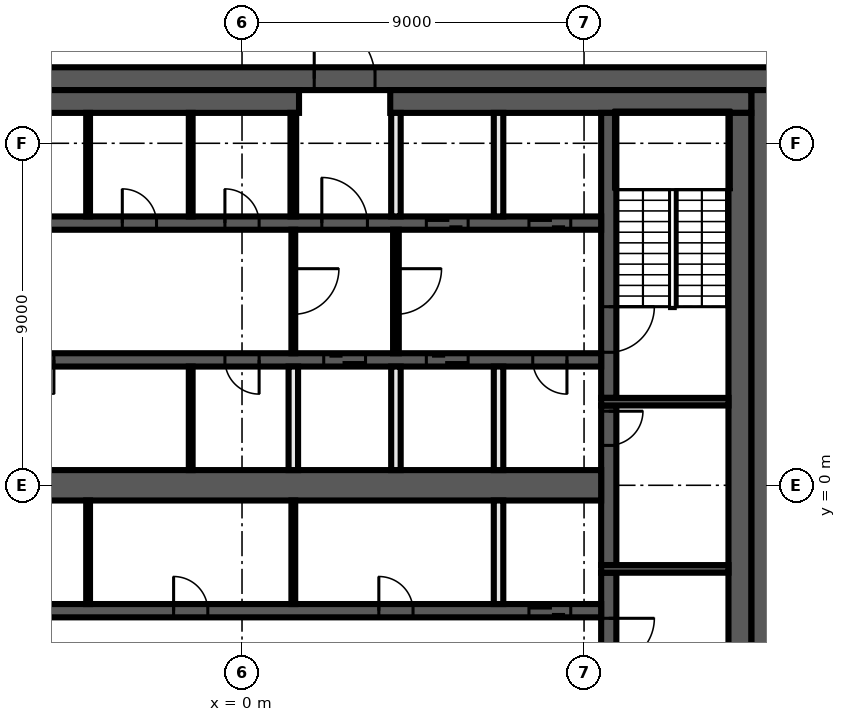
"""IFC4 building model, lengths in metres.
Left out: names, types, materials, properties, quantities, classifications, styles, units other than length and angle.
Written with IfcOpenShell. Run it as: python <this file> out.ifc"""

import sys

from ifc_helpers import new_model, si_unit, direction, frame, frame_2d, origin, place, context, subcontext, project, spatial, rectangle, extrude, element, fill, save


model = new_model("IFC4")
c1 = context("Model", 3, precision=1e-05, world=origin(), true_north=direction((0.0, 1.0)))
c2 = subcontext(c1, "Body", "Model", "MODEL_VIEW")
j1 = project(units=[si_unit("LENGTHUNIT", "METRE"), si_unit("PLANEANGLEUNIT", "RADIAN")], contexts=[c1])
p1 = place(None, origin())
s1 = spatial("IfcSite", under=j1, at=p1, CompositionType="ELEMENT")
p2 = place(p1, origin())
s2 = spatial("IfcBuilding", under=s1, at=p2, CompositionType="ELEMENT")
p3 = place(p2, frame((0.0, 0.0, 319.4)))
s3 = spatial("IfcBuildingStorey", under=s2, at=p3, CompositionType="ELEMENT", Elevation=319.4)
p4 = place(p3, frame((-14.0, 10.7, 0.0), z_axis=(0.0, 0.0, 1.0), x_axis=(1.0, 0.0, 0.0)))
e1 = element("IfcWall", 1, at=p4, inside=s3, PredefinedType="SHEAR", context=c2, shape_type="SweptSolid", body=[
    extrude(rectangle(XDim=28.0, YDim=0.6, at=frame_2d((14.0, 0.0))), origin(), (0.0, 0.0, 1.0), 3.82),
])
p5 = place(p4, frame((15.9, 0.0, 0.0)))
e2 = element("IfcOpeningElement", 2, at=p5, cuts=e1, PredefinedType="OPENING", context=c2, shape_type="SweptSolid", body=[
    extrude(rectangle(XDim=1.6, YDim=2.1, at=frame_2d((0.8, 1.05))), frame((0.0, 0.31, 0.0), z_axis=(0.0, -1.0, 0.0), x_axis=(1.0, 0.0, 0.0)), (0.0, 0.0, 1.0), 0.62),
])
p6 = place(p3, frame((13.7, 10.4, 0.0), z_axis=(0.0, 0.0, 1.0), x_axis=(0.0, -1.0, 0.0)))
e3 = element("IfcWall", 3, at=p6, inside=s3, PredefinedType="SHEAR", context=c2, shape_type="SweptSolid", body=[
    extrude(rectangle(XDim=20.8, YDim=0.6, at=frame_2d((10.4, 0.0))), origin(), (0.0, 0.0, 1.0), 3.82),
])
p7 = place(p3, frame((-13.4, 10.1, 0.0), z_axis=(0.0, 0.0, 1.0), x_axis=(1.0, 0.0, 0.0)))
e4 = element("IfcWall", 4, at=p7, inside=s3, PredefinedType="SHEAR", context=c2, shape_type="SweptSolid", body=[
    extrude(rectangle(XDim=14.9, YDim=0.6, at=frame_2d((7.45, 0.0))), origin(), (0.0, 0.0, 1.0), 3.82),
])
p8 = place(p3, frame((3.9, 10.1, 0.0), z_axis=(0.0, 0.0, 1.0), x_axis=(1.0, 0.0, 0.0)))
e5 = element("IfcWall", 5, at=p8, inside=s3, PredefinedType="SHEAR", context=c2, shape_type="SweptSolid", body=[
    extrude(rectangle(XDim=9.5, YDim=0.6, at=frame_2d((4.75, 0.0))), origin(), (0.0, 0.0, 1.0), 3.82),
])
p9 = place(p3, frame((13.1, 9.8, 0.0), z_axis=(0.0, 0.0, 1.0), x_axis=(0.0, -1.0, 0.0)))
e6 = element("IfcWall", 6, at=p9, inside=s3, PredefinedType="SHEAR", context=c2, shape_type="SweptSolid", body=[
    extrude(rectangle(XDim=19.6, YDim=0.6, at=frame_2d((9.8, 0.0))), origin(), (0.0, 0.0, 1.0), 3.82),
])
p10 = place(p3, frame((9.65, -2.3, 0.0), z_axis=(0.0, 0.0, 1.0), x_axis=(0.0, -1.0, 0.0)))
e7 = element("IfcWall", 7, at=p10, inside=s3, PredefinedType="SHEAR", context=c2, shape_type="SweptSolid", body=[
    extrude(rectangle(XDim=7.5, YDim=0.4, at=frame_2d((3.75, 0.0))), origin(), (0.0, 0.0, 1.0), 3.82),
])
p11 = place(p10, frame((1.2, 0.0, 0.0)))
e8 = element("IfcOpeningElement", 8, at=p11, cuts=e7, PredefinedType="OPENING", context=c2, shape_type="SweptSolid", body=[
    extrude(rectangle(XDim=1.2, YDim=2.1, at=frame_2d((0.6, 1.05))), frame((0.0, 0.21, 0.0), z_axis=(0.0, -1.0, 0.0), x_axis=(1.0, 0.0, 0.0)), (0.0, 0.0, 1.0), 0.42),
])
p12 = place(p3, frame((9.65, 2.1, 0.0), z_axis=(0.0, 0.0, 1.0), x_axis=(0.0, -1.0, 0.0)))
e9 = element("IfcWall", 9, at=p12, inside=s3, PredefinedType="SHEAR", context=c2, shape_type="SweptSolid", body=[
    extrude(rectangle(XDim=4.2, YDim=0.4, at=frame_2d((2.1, 0.0))), origin(), (0.0, 0.0, 1.0), 3.82),
])
p13 = place(p12, frame((0.15, 0.0, 0.0)))
e10 = element("IfcOpeningElement", 10, at=p13, cuts=e9, PredefinedType="OPENING", context=c2, shape_type="SweptSolid", body=[
    extrude(rectangle(XDim=0.9, YDim=2.1, at=frame_2d((0.45, 1.05))), frame((0.0, 0.21, 0.0), z_axis=(0.0, -1.0, 0.0), x_axis=(1.0, 0.0, 0.0)), (0.0, 0.0, 1.0), 0.42),
])
p14 = place(p3, frame((9.65, 9.8, 0.0), z_axis=(0.0, 0.0, 1.0), x_axis=(0.0, -1.0, 0.0)))
e11 = element("IfcWall", 11, at=p14, inside=s3, PredefinedType="SHEAR", context=c2, shape_type="SweptSolid", body=[
    extrude(rectangle(XDim=7.5, YDim=0.4, at=frame_2d((3.75, 0.0))), origin(), (0.0, 0.0, 1.0), 3.82),
])
p15 = place(p14, frame((5.1, 0.0, 0.0)))
e12 = element("IfcOpeningElement", 12, at=p15, cuts=e11, PredefinedType="OPENING", context=c2, shape_type="SweptSolid", body=[
    extrude(rectangle(XDim=1.2, YDim=2.1, at=frame_2d((0.6, 1.05))), frame((0.0, 0.21, 0.0), z_axis=(0.0, -1.0, 0.0), x_axis=(1.0, 0.0, 0.0)), (0.0, 0.0, 1.0), 0.42),
])
for number, where, z_axis, x_axis in (
    (13, (9.45, 2.2, 0.0), (0.0, 0.0, 1.0), (1.0, 0.0, 0.0)),
    (14, (9.45, -2.2, 0.0), (0.0, 0.0, 1.0), (1.0, 0.0, 0.0)),
):
    element("IfcWall", number, at=place(p3, frame(where, z_axis=z_axis, x_axis=x_axis)), inside=s3, PredefinedType="SHEAR", context=c2, shape_type="SweptSolid", body=[
        extrude(rectangle(XDim=3.35, YDim=0.2, at=frame_2d((1.675, 0.0))), origin(), (0.0, 0.0, 1.0), 3.82),
    ])
p16 = place(p3, frame((-9.45, 6.9, 0.0), z_axis=(0.0, 0.0, 1.0), x_axis=(1.0, 0.0, 0.0)))
e15 = element("IfcWall", 15, at=p16, inside=s3, PredefinedType="SHEAR", context=c2, shape_type="SweptSolid", body=[
    extrude(rectangle(XDim=18.9, YDim=0.35, at=frame_2d((9.45, 0.0))), origin(), (0.0, 0.0, 1.0), 3.82),
])
p17 = place(p16, frame((11.55, 0.0, 0.0)))
e16 = element("IfcOpeningElement", 16, at=p17, cuts=e15, PredefinedType="OPENING", context=c2, shape_type="SweptSolid", body=[
    extrude(rectangle(XDim=1.2, YDim=2.1, at=frame_2d((0.6, 1.05))), frame((0.0, 0.185, 0.0), z_axis=(0.0, -1.0, 0.0), x_axis=(1.0, 0.0, 0.0)), (0.0, 0.0, 1.0), 0.37),
])
p18 = place(p16, frame((14.3, 0.0, 0.0)))
e17 = element("IfcOpeningElement", 17, at=p18, cuts=e15, PredefinedType="OPENING", context=c2, shape_type="SweptSolid", body=[
    extrude(rectangle(XDim=1.1, YDim=2.1, at=frame_2d((0.55, 1.05))), frame((0.0, 0.185, 0.0), z_axis=(0.0, -1.0, 0.0), x_axis=(1.0, 0.0, 0.0)), (0.0, 0.0, 1.0), 0.37),
])
p19 = place(p16, frame((17.0, 0.0, 0.0)))
e18 = element("IfcOpeningElement", 18, at=p19, cuts=e15, PredefinedType="OPENING", context=c2, shape_type="SweptSolid", body=[
    extrude(rectangle(XDim=1.1, YDim=2.1, at=frame_2d((0.55, 1.05))), frame((0.0, 0.185, 0.0), z_axis=(0.0, -1.0, 0.0), x_axis=(1.0, 0.0, 0.0)), (0.0, 0.0, 1.0), 0.37),
])
p20 = place(p16, frame((2.25, 0.0, 0.0)))
e19 = element("IfcOpeningElement", 19, at=p20, cuts=e15, PredefinedType="OPENING", context=c2, shape_type="SweptSolid", body=[
    extrude(rectangle(XDim=0.9, YDim=2.1, at=frame_2d((0.45, 1.05))), frame((0.0, 0.185, 0.0), z_axis=(0.0, -1.0, 0.0), x_axis=(1.0, 0.0, 0.0)), (0.0, 0.0, 1.0), 0.37),
])
p21 = place(p16, frame((6.3, 0.0, 0.0)))
e20 = element("IfcOpeningElement", 20, at=p21, cuts=e15, PredefinedType="OPENING", context=c2, shape_type="SweptSolid", body=[
    extrude(rectangle(XDim=0.9, YDim=2.1, at=frame_2d((0.45, 1.05))), frame((0.0, 0.185, 0.0), z_axis=(0.0, -1.0, 0.0), x_axis=(1.0, 0.0, 0.0)), (0.0, 0.0, 1.0), 0.37),
])
p22 = place(p16, frame((9.0, 0.0, 0.0)))
e21 = element("IfcOpeningElement", 21, at=p22, cuts=e15, PredefinedType="OPENING", context=c2, shape_type="SweptSolid", body=[
    extrude(rectangle(XDim=0.9, YDim=2.1, at=frame_2d((0.45, 1.05))), frame((0.0, 0.185, 0.0), z_axis=(0.0, -1.0, 0.0), x_axis=(1.0, 0.0, 0.0)), (0.0, 0.0, 1.0), 0.37),
])
p23 = place(p3, frame((9.45, 3.3, 0.0), z_axis=(0.0, 0.0, 1.0), x_axis=(-1.0, 0.0, 0.0)))
e22 = element("IfcWall", 22, at=p23, inside=s3, PredefinedType="SHEAR", context=c2, shape_type="SweptSolid", body=[
    extrude(rectangle(XDim=18.9, YDim=0.35, at=frame_2d((9.45, 0.0))), origin(), (0.0, 0.0, 1.0), 3.82),
])
p24 = place(p23, frame((6.2, 0.0, 0.0)))
e23 = element("IfcOpeningElement", 23, at=p24, cuts=e22, PredefinedType="OPENING", context=c2, shape_type="SweptSolid", body=[
    extrude(rectangle(XDim=1.1, YDim=2.1, at=frame_2d((0.55, 1.05))), frame((0.0, 0.185, 0.0), z_axis=(0.0, -1.0, 0.0), x_axis=(1.0, 0.0, 0.0)), (0.0, 0.0, 1.0), 0.37),
])
p25 = place(p23, frame((3.5, 0.0, 0.0)))
e24 = element("IfcOpeningElement", 24, at=p25, cuts=e22, PredefinedType="OPENING", context=c2, shape_type="SweptSolid", body=[
    extrude(rectangle(XDim=1.1, YDim=2.1, at=frame_2d((0.55, 1.05))), frame((0.0, 0.185, 0.0), z_axis=(0.0, -1.0, 0.0), x_axis=(1.0, 0.0, 0.0)), (0.0, 0.0, 1.0), 0.37),
])
p26 = place(p23, frame((0.9, 0.0, 0.0)))
e25 = element("IfcOpeningElement", 25, at=p26, cuts=e22, PredefinedType="OPENING", context=c2, shape_type="SweptSolid", body=[
    extrude(rectangle(XDim=0.9, YDim=2.1, at=frame_2d((0.45, 1.05))), frame((0.0, 0.185, 0.0), z_axis=(0.0, -1.0, 0.0), x_axis=(1.0, 0.0, 0.0)), (0.0, 0.0, 1.0), 0.37),
])
p27 = place(p23, frame((14.4, 0.0, 0.0)))
e26 = element("IfcOpeningElement", 26, at=p27, cuts=e22, PredefinedType="OPENING", context=c2, shape_type="SweptSolid", body=[
    extrude(rectangle(XDim=0.9, YDim=2.1, at=frame_2d((0.45, 1.05))), frame((0.0, 0.185, 0.0), z_axis=(0.0, -1.0, 0.0), x_axis=(1.0, 0.0, 0.0)), (0.0, 0.0, 1.0), 0.37),
])
p28 = place(p23, frame((9.0, 0.0, 0.0)))
e27 = element("IfcOpeningElement", 27, at=p28, cuts=e22, PredefinedType="OPENING", context=c2, shape_type="SweptSolid", body=[
    extrude(rectangle(XDim=0.9, YDim=2.1, at=frame_2d((0.45, 1.05))), frame((0.0, 0.185, 0.0), z_axis=(0.0, -1.0, 0.0), x_axis=(1.0, 0.0, 0.0)), (0.0, 0.0, 1.0), 0.37),
])
p29 = place(p3, frame((-9.45, -3.3, 0.0), z_axis=(0.0, 0.0, 1.0), x_axis=(1.0, 0.0, 0.0)))
e28 = element("IfcWall", 28, at=p29, inside=s3, PredefinedType="SHEAR", context=c2, shape_type="SweptSolid", body=[
    extrude(rectangle(XDim=18.9, YDim=0.35, at=frame_2d((9.45, 0.0))), origin(), (0.0, 0.0, 1.0), 3.82),
])
p30 = place(p29, frame((17.0, 0.0, 0.0)))
e29 = element("IfcOpeningElement", 29, at=p30, cuts=e28, PredefinedType="OPENING", context=c2, shape_type="SweptSolid", body=[
    extrude(rectangle(XDim=1.1, YDim=2.1, at=frame_2d((0.55, 1.05))), frame((0.0, 0.185, 0.0), z_axis=(0.0, -1.0, 0.0), x_axis=(1.0, 0.0, 0.0)), (0.0, 0.0, 1.0), 0.37),
])
p31 = place(p29, frame((2.25, 0.0, 0.0)))
e30 = element("IfcOpeningElement", 30, at=p31, cuts=e28, PredefinedType="OPENING", context=c2, shape_type="SweptSolid", body=[
    extrude(rectangle(XDim=0.9, YDim=2.1, at=frame_2d((0.45, 1.05))), frame((0.0, 0.185, 0.0), z_axis=(0.0, -1.0, 0.0), x_axis=(1.0, 0.0, 0.0)), (0.0, 0.0, 1.0), 0.37),
])
p32 = place(p29, frame((7.65, 0.0, 0.0)))
e31 = element("IfcOpeningElement", 31, at=p32, cuts=e28, PredefinedType="OPENING", context=c2, shape_type="SweptSolid", body=[
    extrude(rectangle(XDim=0.9, YDim=2.1, at=frame_2d((0.45, 1.05))), frame((0.0, 0.185, 0.0), z_axis=(0.0, -1.0, 0.0), x_axis=(1.0, 0.0, 0.0)), (0.0, 0.0, 1.0), 0.37),
])
p33 = place(p29, frame((13.05, 0.0, 0.0)))
e32 = element("IfcOpeningElement", 32, at=p33, cuts=e28, PredefinedType="OPENING", context=c2, shape_type="SweptSolid", body=[
    extrude(rectangle(XDim=0.9, YDim=2.1, at=frame_2d((0.45, 1.05))), frame((0.0, 0.185, 0.0), z_axis=(0.0, -1.0, 0.0), x_axis=(1.0, 0.0, 0.0)), (0.0, 0.0, 1.0), 0.37),
])
p34 = place(p3, frame((-9.45, 0.0, 0.0), z_axis=(0.0, 0.0, 1.0), x_axis=(1.0, 0.0, 0.0)))
e33 = element("IfcWall", 33, at=p34, inside=s3, PredefinedType="SHEAR", context=c2, shape_type="SweptSolid", body=[
    extrude(rectangle(XDim=18.9, YDim=0.8, at=frame_2d((9.45, 0.0))), origin(), (0.0, 0.0, 1.0), 3.82),
])
for number, where, z_axis, x_axis in (
    (34, (6.75, -3.125, 0.0), (0.0, 0.0, 1.0), (0.0, 1.0, 0.0)),
    (35, (6.75, 0.4, 0.0), (0.0, 0.0, 1.0), (0.0, 1.0, 0.0)),
    (36, (6.75, 7.075, 0.0), (0.0, 0.0, 1.0), (0.0, 1.0, 0.0)),
):
    element("IfcWall", number, at=place(p3, frame(where, z_axis=z_axis, x_axis=x_axis)), inside=s3, PredefinedType="SOLIDWALL", context=c2, shape_type="SweptSolid", body=[
        extrude(rectangle(XDim=2.725, YDim=0.25, at=frame_2d((1.363, 0.0))), origin(), (0.0, 0.0, 1.0), 3.82),
    ])
p35 = place(p3, frame((4.05, 6.725, 0.0), z_axis=(0.0, 0.0, 1.0), x_axis=(0.0, -1.0, 0.0)))
e37 = element("IfcWall", 37, at=p35, inside=s3, PredefinedType="PARTITIONING", context=c2, shape_type="SweptSolid", body=[
    extrude(rectangle(XDim=3.25, YDim=0.15, at=frame_2d((1.625, 0.0))), origin(), (0.0, 0.0, 1.0), 3.82),
])
p36 = place(p35, frame((1.025, 0.0, 0.0)))
e38 = element("IfcOpeningElement", 38, at=p36, cuts=e37, PredefinedType="OPENING", context=c2, shape_type="SweptSolid", body=[
    extrude(rectangle(XDim=1.2, YDim=2.1, at=frame_2d((0.6, 1.05))), frame((0.0, 0.085, 0.0), z_axis=(0.0, -1.0, 0.0), x_axis=(1.0, 0.0, 0.0)), (0.0, 0.0, 1.0), 0.17),
])
for number, where, z_axis, x_axis in (
    (39, (4.05, 0.4, 0.0), (0.0, 0.0, 1.0), (0.0, 1.0, 0.0)),
    (40, (4.05, 7.075, 0.0), (0.0, 0.0, 1.0), (0.0, 1.0, 0.0)),
):
    element("IfcWall", number, at=place(p3, frame(where, z_axis=z_axis, x_axis=x_axis)), inside=s3, PredefinedType="SOLIDWALL", context=c2, shape_type="SweptSolid", body=[
        extrude(rectangle(XDim=2.725, YDim=0.25, at=frame_2d((1.363, 0.0))), origin(), (0.0, 0.0, 1.0), 3.82),
    ])
p37 = place(p3, frame((1.35, 7.075, 0.0), z_axis=(0.0, 0.0, 1.0), x_axis=(0.0, 1.0, 0.0)))
e41 = element("IfcWall", 41, at=p37, inside=s3, PredefinedType="PARTITIONING", context=c2, shape_type="SweptSolid", body=[
    extrude(rectangle(XDim=2.725, YDim=0.15, at=frame_2d((1.363, 0.0))), origin(), (0.0, 0.0, 1.0), 3.82),
])
p38 = place(p3, frame((1.35, -3.125, 0.0), z_axis=(0.0, 0.0, 1.0), x_axis=(0.0, 1.0, 0.0)))
e42 = element("IfcWall", 42, at=p38, inside=s3, PredefinedType="PARTITIONING", context=c2, shape_type="SweptSolid", body=[
    extrude(rectangle(XDim=2.725, YDim=0.1, at=frame_2d((1.363, 0.0))), origin(), (0.0, 0.0, 1.0), 3.82),
])
p39 = place(p3, frame((1.35, 6.725, 0.0), z_axis=(0.0, 0.0, 1.0), x_axis=(0.0, -1.0, 0.0)))
e43 = element("IfcWall", 43, at=p39, inside=s3, PredefinedType="PARTITIONING", context=c2, shape_type="SweptSolid", body=[
    extrude(rectangle(XDim=3.25, YDim=0.1, at=frame_2d((1.625, 0.0))), origin(), (0.0, 0.0, 1.0), 3.82),
])
p40 = place(p39, frame((1.025, 0.0, 0.0)))
e44 = element("IfcOpeningElement", 44, at=p40, cuts=e43, PredefinedType="OPENING", context=c2, shape_type="SweptSolid", body=[
    extrude(rectangle(XDim=1.2, YDim=2.1, at=frame_2d((0.6, 1.05))), frame((0.0, 0.06, 0.0), z_axis=(0.0, -1.0, 0.0), x_axis=(1.0, 0.0, 0.0)), (0.0, 0.0, 1.0), 0.12),
])
p41 = place(p3, frame((1.35, 0.4, 0.0), z_axis=(0.0, 0.0, 1.0), x_axis=(0.0, 1.0, 0.0)))
e45 = element("IfcWall", 45, at=p41, inside=s3, PredefinedType="SOLIDWALL", context=c2, shape_type="SweptSolid", body=[
    extrude(rectangle(XDim=2.725, YDim=0.25, at=frame_2d((1.363, 0.0))), origin(), (0.0, 0.0, 1.0), 3.82),
])
for number, where, z_axis, x_axis in (
    (46, (-1.35, 0.4, 0.0), (0.0, 0.0, 1.0), (0.0, 1.0, 0.0)),
    (47, (-1.35, 7.075, 0.0), (0.0, 0.0, 1.0), (0.0, 1.0, 0.0)),
    (48, (-4.05, -3.125, 0.0), (0.0, 0.0, 1.0), (0.0, 1.0, 0.0)),
    (49, (-4.05, 7.075, 0.0), (0.0, 0.0, 1.0), (0.0, 1.0, 0.0)),
):
    element("IfcWall", number, at=place(p3, frame(where, z_axis=z_axis, x_axis=x_axis)), inside=s3, PredefinedType="PARTITIONING", context=c2, shape_type="SweptSolid", body=[
        extrude(rectangle(XDim=2.725, YDim=0.1, at=frame_2d((1.363, 0.0))), origin(), (0.0, 0.0, 1.0), 3.82),
    ])
p42 = place(p13, origin())
e50 = element("IfcDoor", 50, at=p42, inside=s3, OperationType="SINGLE_SWING_RIGHT", PredefinedType="DOOR", context=c2, shape_type="SweptSolid", body=[
    extrude(rectangle(XDim=0.9, YDim=2.1, at=frame_2d((0.45, 1.05))), frame((0.0, 0.025, 0.0), z_axis=(0.0, -1.0, 0.0), x_axis=(1.0, 0.0, 0.0)), (0.0, 0.0, 1.0), 0.05),
])
fill(e10, e50)
p43 = place(p5, origin())
e51 = element("IfcDoor", 51, at=p43, inside=s3, OperationType="DOUBLE_DOOR_SINGLE_SWING", PredefinedType="DOOR", context=c2, shape_type="SweptSolid", body=[
    extrude(rectangle(XDim=1.6, YDim=2.1, at=frame_2d((0.8, 1.05))), frame((0.0, 0.025, 0.0), z_axis=(0.0, -1.0, 0.0), x_axis=(1.0, 0.0, 0.0)), (0.0, 0.0, 1.0), 0.05),
])
fill(e2, e51)
p44 = place(p17, origin())
e52 = element("IfcDoor", 52, at=p44, inside=s3, OperationType="SINGLE_SWING_LEFT", PredefinedType="DOOR", context=c2, shape_type="SweptSolid", body=[
    extrude(rectangle(XDim=1.2, YDim=2.1, at=frame_2d((0.6, 1.05))), frame((0.0, 0.025, 0.0), z_axis=(0.0, -1.0, 0.0), x_axis=(1.0, 0.0, 0.0)), (0.0, 0.0, 1.0), 0.05),
])
fill(e16, e52)
p45 = place(p18, origin())
e53 = element("IfcDoor", 53, at=p45, inside=s3, OperationType="DOUBLE_DOOR_SLIDING", PredefinedType="DOOR", context=c2, shape_type="SweptSolid", body=[
    extrude(rectangle(XDim=1.1, YDim=2.1, at=frame_2d((0.55, 1.05))), frame((0.0, 0.025, 0.0), z_axis=(0.0, -1.0, 0.0), x_axis=(1.0, 0.0, 0.0)), (0.0, 0.0, 1.0), 0.05),
])
fill(e17, e53)
p46 = place(p19, origin())
e54 = element("IfcDoor", 54, at=p46, inside=s3, OperationType="DOUBLE_DOOR_SLIDING", PredefinedType="DOOR", context=c2, shape_type="SweptSolid", body=[
    extrude(rectangle(XDim=1.1, YDim=2.1, at=frame_2d((0.55, 1.05))), frame((0.0, 0.025, 0.0), z_axis=(0.0, -1.0, 0.0), x_axis=(1.0, 0.0, 0.0)), (0.0, 0.0, 1.0), 0.05),
])
fill(e18, e54)
p47 = place(p24, origin())
e55 = element("IfcDoor", 55, at=p47, inside=s3, OperationType="DOUBLE_DOOR_SLIDING", PredefinedType="DOOR", context=c2, shape_type="SweptSolid", body=[
    extrude(rectangle(XDim=1.1, YDim=2.1, at=frame_2d((0.55, 1.05))), frame((0.0, 0.025, 0.0), z_axis=(0.0, -1.0, 0.0), x_axis=(1.0, 0.0, 0.0)), (0.0, 0.0, 1.0), 0.05),
])
fill(e23, e55)
p48 = place(p25, origin())
e56 = element("IfcDoor", 56, at=p48, inside=s3, OperationType="DOUBLE_DOOR_SLIDING", PredefinedType="DOOR", context=c2, shape_type="SweptSolid", body=[
    extrude(rectangle(XDim=1.1, YDim=2.1, at=frame_2d((0.55, 1.05))), frame((0.0, 0.025, 0.0), z_axis=(0.0, -1.0, 0.0), x_axis=(1.0, 0.0, 0.0)), (0.0, 0.0, 1.0), 0.05),
])
fill(e24, e56)
p49 = place(p26, origin())
e57 = element("IfcDoor", 57, at=p49, inside=s3, OperationType="SINGLE_SWING_LEFT", PredefinedType="DOOR", context=c2, shape_type="SweptSolid", body=[
    extrude(rectangle(XDim=0.9, YDim=2.1, at=frame_2d((0.45, 1.05))), frame((0.0, 0.025, 0.0), z_axis=(0.0, -1.0, 0.0), x_axis=(1.0, 0.0, 0.0)), (0.0, 0.0, 1.0), 0.05),
])
fill(e25, e57)
p50 = place(p30, origin())
e58 = element("IfcDoor", 58, at=p50, inside=s3, OperationType="DOUBLE_DOOR_SLIDING", PredefinedType="DOOR", context=c2, shape_type="SweptSolid", body=[
    extrude(rectangle(XDim=1.1, YDim=2.1, at=frame_2d((0.55, 1.05))), frame((0.0, 0.025, 0.0), z_axis=(0.0, -1.0, 0.0), x_axis=(1.0, 0.0, 0.0)), (0.0, 0.0, 1.0), 0.05),
])
fill(e29, e58)
p51 = place(p21, origin())
e59 = element("IfcDoor", 59, at=p51, inside=s3, OperationType="SINGLE_SWING_LEFT", PredefinedType="DOOR", context=c2, shape_type="SweptSolid", body=[
    extrude(rectangle(XDim=0.9, YDim=2.1, at=frame_2d((0.45, 1.05))), frame((0.0, 0.025, 0.0), z_axis=(0.0, -1.0, 0.0), x_axis=(1.0, 0.0, 0.0)), (0.0, 0.0, 1.0), 0.05),
])
fill(e20, e59)
p52 = place(p22, origin())
e60 = element("IfcDoor", 60, at=p52, inside=s3, OperationType="SINGLE_SWING_RIGHT", PredefinedType="DOOR", context=c2, shape_type="SweptSolid", body=[
    extrude(rectangle(XDim=0.9, YDim=2.1, at=frame_2d((0.45, 1.05))), frame((0.0, 0.025, 0.0), z_axis=(0.0, -1.0, 0.0), x_axis=(1.0, 0.0, 0.0)), (0.0, 0.0, 1.0), 0.05),
])
fill(e21, e60)
p53 = place(p27, origin())
e61 = element("IfcDoor", 61, at=p53, inside=s3, OperationType="SINGLE_SWING_LEFT", PredefinedType="DOOR", context=c2, shape_type="SweptSolid", body=[
    extrude(rectangle(XDim=0.9, YDim=2.1, at=frame_2d((0.45, 1.05))), frame((0.0, 0.025, 0.0), z_axis=(0.0, -1.0, 0.0), x_axis=(1.0, 0.0, 0.0)), (0.0, 0.0, 1.0), 0.05),
])
fill(e26, e61)
p54 = place(p28, origin())
e62 = element("IfcDoor", 62, at=p54, inside=s3, OperationType="SINGLE_SWING_RIGHT", PredefinedType="DOOR", context=c2, shape_type="SweptSolid", body=[
    extrude(rectangle(XDim=0.9, YDim=2.1, at=frame_2d((0.45, 1.05))), frame((0.0, 0.025, 0.0), z_axis=(0.0, -1.0, 0.0), x_axis=(1.0, 0.0, 0.0)), (0.0, 0.0, 1.0), 0.05),
])
fill(e27, e62)
p55 = place(p32, origin())
e63 = element("IfcDoor", 63, at=p55, inside=s3, OperationType="SINGLE_SWING_RIGHT", PredefinedType="DOOR", context=c2, shape_type="SweptSolid", body=[
    extrude(rectangle(XDim=0.9, YDim=2.1, at=frame_2d((0.45, 1.05))), frame((0.0, 0.025, 0.0), z_axis=(0.0, -1.0, 0.0), x_axis=(1.0, 0.0, 0.0)), (0.0, 0.0, 1.0), 0.05),
])
fill(e31, e63)
p56 = place(p33, origin())
e64 = element("IfcDoor", 64, at=p56, inside=s3, OperationType="SINGLE_SWING_LEFT", PredefinedType="DOOR", context=c2, shape_type="SweptSolid", body=[
    extrude(rectangle(XDim=0.9, YDim=2.1, at=frame_2d((0.45, 1.05))), frame((0.0, 0.025, 0.0), z_axis=(0.0, -1.0, 0.0), x_axis=(1.0, 0.0, 0.0)), (0.0, 0.0, 1.0), 0.05),
])
fill(e32, e64)
p57 = place(p15, origin())
e65 = element("IfcDoor", 65, at=p57, inside=s3, OperationType="SINGLE_SWING_LEFT", PredefinedType="DOOR", context=c2, shape_type="SweptSolid", body=[
    extrude(rectangle(XDim=1.2, YDim=2.1, at=frame_2d((0.6, 1.05))), frame((0.0, 0.025, 0.0), z_axis=(0.0, -1.0, 0.0), x_axis=(1.0, 0.0, 0.0)), (0.0, 0.0, 1.0), 0.05),
])
fill(e12, e65)
p58 = place(p11, origin())
e66 = element("IfcDoor", 66, at=p58, inside=s3, OperationType="SINGLE_SWING_RIGHT", PredefinedType="DOOR", context=c2, shape_type="SweptSolid", body=[
    extrude(rectangle(XDim=1.2, YDim=2.1, at=frame_2d((0.6, 1.05))), frame((0.0, 0.025, 0.0), z_axis=(0.0, -1.0, 0.0), x_axis=(1.0, 0.0, 0.0)), (0.0, 0.0, 1.0), 0.05),
])
fill(e8, e66)
p59 = place(p40, origin())
e67 = element("IfcDoor", 67, at=p59, inside=s3, OperationType="SINGLE_SWING_LEFT", PredefinedType="DOOR", context=c2, shape_type="SweptSolid", body=[
    extrude(rectangle(XDim=1.2, YDim=2.1, at=frame_2d((0.6, 1.05))), frame((0.0, 0.025, 0.0), z_axis=(0.0, -1.0, 0.0), x_axis=(1.0, 0.0, 0.0)), (0.0, 0.0, 1.0), 0.05),
])
fill(e44, e67)
p60 = place(p36, origin())
e68 = element("IfcDoor", 68, at=p60, inside=s3, OperationType="SINGLE_SWING_RIGHT", PredefinedType="DOOR", context=c2, shape_type="SweptSolid", body=[
    extrude(rectangle(XDim=1.2, YDim=2.1, at=frame_2d((0.6, 1.05))), frame((0.0, 0.025, 0.0), z_axis=(0.0, -1.0, 0.0), x_axis=(1.0, 0.0, 0.0)), (0.0, 0.0, 1.0), 0.05),
])
fill(e38, e68)
save(model, sys.argv[1])
